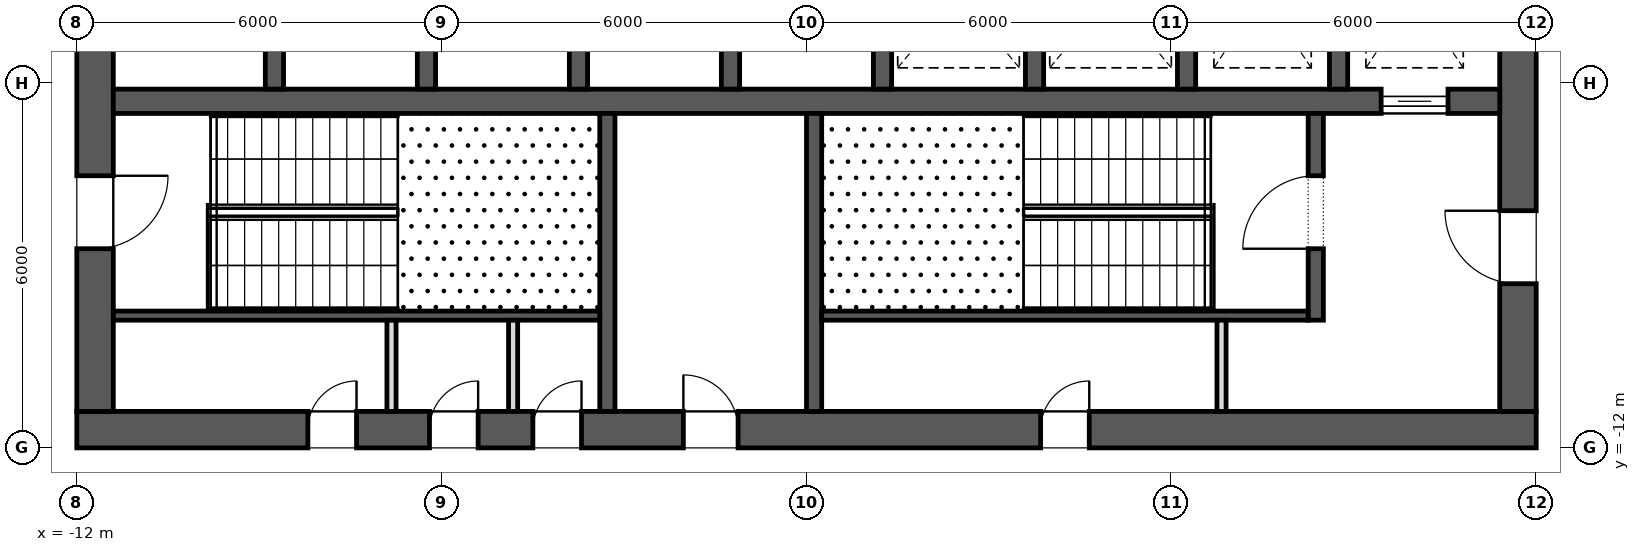
"""IFC4 building model, lengths in metres.
Left out: names, types, materials, properties, quantities, classifications, styles, units other than length and angle.
Written with IfcOpenShell. Run it as: python <this file> out.ifc"""

import sys

from ifc_helpers import new_model, si_unit, direction, frame, frame_2d, origin, place, context, subcontext, project, spatial, rectangle, extrude, element, fill, save


model = new_model("IFC4")
c1 = context("Model", 3, precision=1e-05, world=origin(), true_north=direction((0.0, 1.0)))
c2 = subcontext(c1, "Body", "Model", "MODEL_VIEW")
j1 = project(units=[si_unit("LENGTHUNIT", "METRE"), si_unit("PLANEANGLEUNIT", "RADIAN")], contexts=[c1])
p1 = place(None, origin())
s1 = spatial("IfcSite", under=j1, at=p1, CompositionType="ELEMENT")
p2 = place(p1, origin())
s2 = spatial("IfcBuilding", under=s1, at=p2, CompositionType="ELEMENT")
p3 = place(p2, frame((0.0, 0.0, 142.3)))
s3 = spatial("IfcBuildingStorey", under=s2, at=p3, CompositionType="ELEMENT", Elevation=142.3)
p4 = place(p3, frame((-12.0, -11.7, 0.0), z_axis=(0.0, 0.0, 1.0), x_axis=(1.0, 0.0, 0.0)))
e1 = element("IfcWall", 1, at=p4, inside=s3, PredefinedType="SHEAR", context=c2, shape_type="SweptSolid", body=[
    extrude(rectangle(XDim=24.0, YDim=0.6, at=frame_2d((12.0, 0.0))), origin(), (0.0, 0.0, 1.0), 4.2),
])
p5 = place(p4, frame((9.975, 0.0, 0.0)))
e2 = element("IfcOpeningElement", 2, at=p5, cuts=e1, PredefinedType="OPENING", context=c2, shape_type="SweptSolid", body=[
    extrude(rectangle(XDim=0.9, YDim=2.1, at=frame_2d((0.45, 1.05))), frame((0.0, 0.312, 0.0), z_axis=(0.0, -1.0, 0.0), x_axis=(1.0, 0.0, 0.0)), (0.0, 0.0, 1.0), 0.624),
])
p6 = place(p4, frame((3.8, 0.0, 0.0)))
e3 = element("IfcOpeningElement", 3, at=p6, cuts=e1, PredefinedType="OPENING", context=c2, shape_type="SweptSolid", body=[
    extrude(rectangle(XDim=0.8, YDim=2.1, at=frame_2d((0.4, 1.05))), frame((0.0, 0.312, 0.0), z_axis=(0.0, -1.0, 0.0), x_axis=(1.0, 0.0, 0.0)), (0.0, 0.0, 1.0), 0.624),
])
p7 = place(p4, frame((5.8, 0.0, 0.0)))
e4 = element("IfcOpeningElement", 4, at=p7, cuts=e1, PredefinedType="OPENING", context=c2, shape_type="SweptSolid", body=[
    extrude(rectangle(XDim=0.8, YDim=2.1, at=frame_2d((0.4, 1.05))), frame((0.0, 0.312, 0.0), z_axis=(0.0, -1.0, 0.0), x_axis=(1.0, 0.0, 0.0)), (0.0, 0.0, 1.0), 0.624),
])
p8 = place(p4, frame((7.5, 0.0, 0.0)))
e5 = element("IfcOpeningElement", 5, at=p8, cuts=e1, PredefinedType="OPENING", context=c2, shape_type="SweptSolid", body=[
    extrude(rectangle(XDim=0.8, YDim=2.1, at=frame_2d((0.4, 1.05))), frame((0.0, 0.312, 0.0), z_axis=(0.0, -1.0, 0.0), x_axis=(1.0, 0.0, 0.0)), (0.0, 0.0, 1.0), 0.624),
])
p9 = place(p4, frame((15.85, 0.0, 0.0)))
e6 = element("IfcOpeningElement", 6, at=p9, cuts=e1, PredefinedType="OPENING", context=c2, shape_type="SweptSolid", body=[
    extrude(rectangle(XDim=0.8, YDim=2.1, at=frame_2d((0.4, 1.05))), frame((0.0, 0.312, 0.0), z_axis=(0.0, -1.0, 0.0), x_axis=(1.0, 0.0, 0.0)), (0.0, 0.0, 1.0), 0.624),
])
p10 = place(p3, frame((11.7, -11.4, 0.0), z_axis=(0.0, 0.0, 1.0), x_axis=(0.0, 1.0, 0.0)))
e7 = element("IfcWall", 7, at=p10, inside=s3, PredefinedType="SHEAR", context=c2, shape_type="SweptSolid", body=[
    extrude(rectangle(XDim=22.8, YDim=0.6, at=frame_2d((11.4, 0.0))), origin(), (0.0, 0.0, 1.0), 4.2),
])
p11 = place(p10, frame((10.2, 0.0, 0.0)))
e8 = element("IfcOpeningElement", 8, at=p11, cuts=e7, PredefinedType="OPENING", context=c2, shape_type="SweptSolid", body=[
    extrude(rectangle(XDim=2.4, YDim=2.1, at=frame_2d((1.2, 1.05))), frame((0.0, 0.312, 0.0), z_axis=(0.0, -1.0, 0.0), x_axis=(1.0, 0.0, 0.0)), (0.0, 0.0, 1.0), 0.624),
])
p12 = place(p10, frame((19.5, 0.0, 0.0)))
e9 = element("IfcOpeningElement", 9, at=p12, cuts=e7, PredefinedType="OPENING", context=c2, shape_type="SweptSolid", body=[
    extrude(rectangle(XDim=1.2, YDim=2.1, at=frame_2d((0.6, 1.05))), frame((0.0, 0.312, 0.0), z_axis=(0.0, -1.0, 0.0), x_axis=(1.0, 0.0, 0.0)), (0.0, 0.0, 1.0), 0.624),
])
p13 = place(p10, frame((2.1, 0.0, 0.0)))
e10 = element("IfcOpeningElement", 10, at=p13, cuts=e7, PredefinedType="OPENING", context=c2, shape_type="SweptSolid", body=[
    extrude(rectangle(XDim=1.2, YDim=2.1, at=frame_2d((0.6, 1.05))), frame((0.0, 0.312, 0.0), z_axis=(0.0, -1.0, 0.0), x_axis=(1.0, 0.0, 0.0)), (0.0, 0.0, 1.0), 0.624),
])
p14 = place(p3, frame((-11.7, -11.4, 0.0), z_axis=(0.0, 0.0, 1.0), x_axis=(0.0, 1.0, 0.0)))
e11 = element("IfcWall", 11, at=p14, inside=s3, PredefinedType="SHEAR", context=c2, shape_type="SweptSolid", body=[
    extrude(rectangle(XDim=22.8, YDim=0.6, at=frame_2d((11.4, 0.0))), origin(), (0.0, 0.0, 1.0), 4.2),
])
p15 = place(p14, frame((10.2, 0.0, 0.0)))
e12 = element("IfcOpeningElement", 12, at=p15, cuts=e11, PredefinedType="OPENING", context=c2, shape_type="SweptSolid", body=[
    extrude(rectangle(XDim=2.4, YDim=2.1, at=frame_2d((1.2, 1.05))), frame((0.0, 0.312, 0.0), z_axis=(0.0, -1.0, 0.0), x_axis=(1.0, 0.0, 0.0)), (0.0, 0.0, 1.0), 0.624),
])
p16 = place(p14, frame((18.925, 0.0, 0.0)))
e13 = element("IfcOpeningElement", 13, at=p16, cuts=e11, PredefinedType="OPENING", context=c2, shape_type="SweptSolid", body=[
    extrude(rectangle(XDim=1.2, YDim=2.1, at=frame_2d((0.6, 1.05))), frame((0.0, 0.312, 0.0), z_axis=(0.0, -1.0, 0.0), x_axis=(1.0, 0.0, 0.0)), (0.0, 0.0, 1.0), 0.624),
])
p17 = place(p14, frame((2.675, 0.0, 0.0)))
e14 = element("IfcOpeningElement", 14, at=p17, cuts=e11, PredefinedType="OPENING", context=c2, shape_type="SweptSolid", body=[
    extrude(rectangle(XDim=1.2, YDim=2.1, at=frame_2d((0.6, 1.05))), frame((0.0, 0.312, 0.0), z_axis=(0.0, -1.0, 0.0), x_axis=(1.0, 0.0, 0.0)), (0.0, 0.0, 1.0), 0.624),
])
p18 = place(p3, frame((-11.4, -6.3, 0.0), z_axis=(0.0, 0.0, 1.0), x_axis=(1.0, 0.0, 0.0)))
e15 = element("IfcWall", 15, at=p18, inside=s3, PredefinedType="SHEAR", context=c2, shape_type="SweptSolid", body=[
    extrude(rectangle(XDim=22.8, YDim=0.4, at=frame_2d((11.4, 0.0))), origin(), (0.0, 0.0, 1.0), 4.2),
])
p19 = place(p18, frame((20.85, 0.0, 0.0)))
e16 = element("IfcOpeningElement", 16, at=p19, cuts=e15, PredefinedType="OPENING", context=c2, shape_type="SweptSolid", body=[
    extrude(rectangle(XDim=1.1, YDim=2.1, at=frame_2d((0.55, 1.05))), frame((0.0, 0.212, 0.0), z_axis=(0.0, -1.0, 0.0), x_axis=(1.0, 0.0, 0.0)), (0.0, 0.0, 1.0), 0.424),
])
for number, where, z_axis, x_axis in (
    (17, (-8.75, -6.1, 0.0), (0.0, 0.0, 1.0), (0.0, 1.0, 0.0)),
    (18, (-6.25, -6.1, 0.0), (0.0, 0.0, 1.0), (0.0, 1.0, 0.0)),
    (19, (-3.75, -6.1, 0.0), (0.0, 0.0, 1.0), (0.0, 1.0, 0.0)),
    (20, (-1.25, -6.1, 0.0), (0.0, 0.0, 1.0), (0.0, 1.0, 0.0)),
    (21, (1.25, -6.1, 0.0), (0.0, 0.0, 1.0), (0.0, 1.0, 0.0)),
    (22, (3.75, -6.1, 0.0), (0.0, 0.0, 1.0), (0.0, 1.0, 0.0)),
    (23, (6.25, -6.1, 0.0), (0.0, 0.0, 1.0), (0.0, 1.0, 0.0)),
    (24, (8.75, -6.1, 0.0), (0.0, 0.0, 1.0), (0.0, 1.0, 0.0)),
):
    element("IfcWall", number, at=place(p3, frame(where, z_axis=z_axis, x_axis=x_axis)), inside=s3, PredefinedType="SHEAR", context=c2, shape_type="SweptSolid", body=[
        extrude(rectangle(XDim=2.9, YDim=0.3, at=frame_2d((1.45, 0.0))), origin(), (0.0, 0.0, 1.0), 4.2),
    ])
for number, where, z_axis, x_axis in (
    (25, (-3.275, -11.4, 0.0), (0.0, 0.0, 1.0), (0.0, 1.0, 0.0)),
    (26, (0.125, -11.4, 0.0), (0.0, 0.0, 1.0), (0.0, 1.0, 0.0)),
):
    element("IfcWall", number, at=place(p3, frame(where, z_axis=z_axis, x_axis=x_axis)), inside=s3, PredefinedType="SHEAR", context=c2, shape_type="SweptSolid", body=[
        extrude(rectangle(XDim=4.9, YDim=0.25, at=frame_2d((2.45, 0.0))), origin(), (0.0, 0.0, 1.0), 3.9),
    ])
p20 = place(p3, frame((8.375, -9.9, 0.0), z_axis=(0.0, 0.0, 1.0), x_axis=(0.0, 1.0, 0.0)))
e27 = element("IfcWall", 27, at=p20, inside=s3, PredefinedType="SHEAR", context=c2, shape_type="SweptSolid", body=[
    extrude(rectangle(XDim=3.4, YDim=0.25, at=frame_2d((1.7, 0.0))), origin(), (0.0, 0.0, 1.0), 3.9),
])
p21 = place(p20, frame((1.175, 0.0, 0.0)))
e28 = element("IfcOpeningElement", 28, at=p21, cuts=e27, PredefinedType="OPENING", context=c2, shape_type="SweptSolid", body=[
    extrude(rectangle(XDim=1.2, YDim=2.1, at=frame_2d((0.6, 1.05))), frame((0.0, 0.137, 0.0), z_axis=(0.0, -1.0, 0.0), x_axis=(1.0, 0.0, 0.0)), (0.0, 0.0, 1.0), 0.274),
])
for number, where, z_axis, x_axis in (
    (29, (-11.4, -9.825, 0.0), (0.0, 0.0, 1.0), (1.0, 0.0, 0.0)),
    (30, (0.25, -9.825, 0.0), (0.0, 0.0, 1.0), (1.0, 0.0, 0.0)),
):
    element("IfcWall", number, at=place(p3, frame(where, z_axis=z_axis, x_axis=x_axis)), inside=s3, PredefinedType="SHEAR", context=c2, shape_type="SweptSolid", body=[
        extrude(rectangle(XDim=8.0, YDim=0.15, at=frame_2d((4.0, 0.0))), origin(), (0.0, 0.0, 1.0), 3.9),
    ])
for number, where, z_axis, x_axis in (
    (31, (-6.825, -11.4, 0.0), (0.0, 0.0, 1.0), (0.0, 1.0, 0.0)),
    (32, (-4.825, -11.4, 0.0), (0.0, 0.0, 1.0), (0.0, 1.0, 0.0)),
    (33, (6.825, -11.4, 0.0), (0.0, 0.0, 1.0), (0.0, 1.0, 0.0)),
):
    element("IfcWall", number, at=place(p3, frame(where, z_axis=z_axis, x_axis=x_axis)), inside=s3, PredefinedType="PARTITIONING", context=c2, shape_type="SweptSolid", body=[
        extrude(rectangle(XDim=1.5, YDim=0.15, at=frame_2d((0.75, 0.0))), origin(), (0.0, 0.0, 1.0), 3.9),
    ])
p22 = place(p19, origin())
e34 = element("IfcDoor", 34, at=p22, inside=s3, OperationType="SLIDING_TO_LEFT", PredefinedType="DOOR", context=c2, shape_type="SweptSolid", body=[
    extrude(rectangle(XDim=1.1, YDim=2.1, at=frame_2d((0.55, 1.05))), frame((0.0, 0.025, 0.0), z_axis=(0.0, -1.0, 0.0), x_axis=(1.0, 0.0, 0.0)), (0.0, 0.0, 1.0), 0.05),
])
fill(e16, e34)
p23 = place(p17, frame((1.2, 0.0, 0.0), z_axis=(0.0, 0.0, 1.0), x_axis=(-1.0, 0.0, 0.0)))
e35 = element("IfcDoor", 35, at=p23, inside=s3, OperationType="SINGLE_SWING_RIGHT", PredefinedType="DOOR", context=c2, shape_type="SweptSolid", body=[
    extrude(rectangle(XDim=1.2, YDim=2.1, at=frame_2d((0.6, 1.05))), frame((0.0, 0.025, 0.0), z_axis=(0.0, -1.0, 0.0), x_axis=(1.0, 0.0, 0.0)), (0.0, 0.0, 1.0), 0.05),
])
fill(e14, e35)
p24 = place(p21, origin())
e36 = element("IfcDoor", 36, at=p24, inside=s3, OperationType="SINGLE_SWING_RIGHT", PredefinedType="DOOR", context=c2, shape_type="SweptSolid", body=[
    extrude(rectangle(XDim=1.2, YDim=2.1, at=frame_2d((0.6, 1.05))), frame((0.0, 0.025, 0.0), z_axis=(0.0, -1.0, 0.0), x_axis=(1.0, 0.0, 0.0)), (0.0, 0.0, 1.0), 0.05),
])
fill(e28, e36)
p25 = place(p13, origin())
e37 = element("IfcDoor", 37, at=p25, inside=s3, OperationType="SINGLE_SWING_LEFT", PredefinedType="DOOR", context=c2, shape_type="SweptSolid", body=[
    extrude(rectangle(XDim=1.2, YDim=2.1, at=frame_2d((0.6, 1.05))), frame((0.0, 0.025, 0.0), z_axis=(0.0, -1.0, 0.0), x_axis=(1.0, 0.0, 0.0)), (0.0, 0.0, 1.0), 0.05),
])
fill(e10, e37)
p26 = place(p5, origin())
e38 = element("IfcDoor", 38, at=p26, inside=s3, OperationType="SINGLE_SWING_RIGHT", PredefinedType="DOOR", context=c2, shape_type="SweptSolid", body=[
    extrude(rectangle(XDim=0.9, YDim=2.1, at=frame_2d((0.45, 1.05))), frame((0.0, 0.025, 0.0), z_axis=(0.0, -1.0, 0.0), x_axis=(1.0, 0.0, 0.0)), (0.0, 0.0, 1.0), 0.05),
])
fill(e2, e38)
p27 = place(p6, origin())
e39 = element("IfcDoor", 39, at=p27, inside=s3, OperationType="SINGLE_SWING_LEFT", PredefinedType="DOOR", context=c2, shape_type="SweptSolid", body=[
    extrude(rectangle(XDim=0.8, YDim=2.1, at=frame_2d((0.4, 1.05))), frame((0.0, 0.025, 0.0), z_axis=(0.0, -1.0, 0.0), x_axis=(1.0, 0.0, 0.0)), (0.0, 0.0, 1.0), 0.05),
])
fill(e3, e39)
p28 = place(p7, origin())
e40 = element("IfcDoor", 40, at=p28, inside=s3, OperationType="SINGLE_SWING_LEFT", PredefinedType="DOOR", context=c2, shape_type="SweptSolid", body=[
    extrude(rectangle(XDim=0.8, YDim=2.1, at=frame_2d((0.4, 1.05))), frame((0.0, 0.025, 0.0), z_axis=(0.0, -1.0, 0.0), x_axis=(1.0, 0.0, 0.0)), (0.0, 0.0, 1.0), 0.05),
])
fill(e4, e40)
p29 = place(p8, origin())
e41 = element("IfcDoor", 41, at=p29, inside=s3, OperationType="SINGLE_SWING_LEFT", PredefinedType="DOOR", context=c2, shape_type="SweptSolid", body=[
    extrude(rectangle(XDim=0.8, YDim=2.1, at=frame_2d((0.4, 1.05))), frame((0.0, 0.025, 0.0), z_axis=(0.0, -1.0, 0.0), x_axis=(1.0, 0.0, 0.0)), (0.0, 0.0, 1.0), 0.05),
])
fill(e5, e41)
p30 = place(p9, origin())
e42 = element("IfcDoor", 42, at=p30, inside=s3, OperationType="SINGLE_SWING_LEFT", PredefinedType="DOOR", context=c2, shape_type="SweptSolid", body=[
    extrude(rectangle(XDim=0.8, YDim=2.1, at=frame_2d((0.4, 1.05))), frame((0.0, 0.025, 0.0), z_axis=(0.0, -1.0, 0.0), x_axis=(1.0, 0.0, 0.0)), (0.0, 0.0, 1.0), 0.05),
])
fill(e6, e42)
save(model, sys.argv[1])
